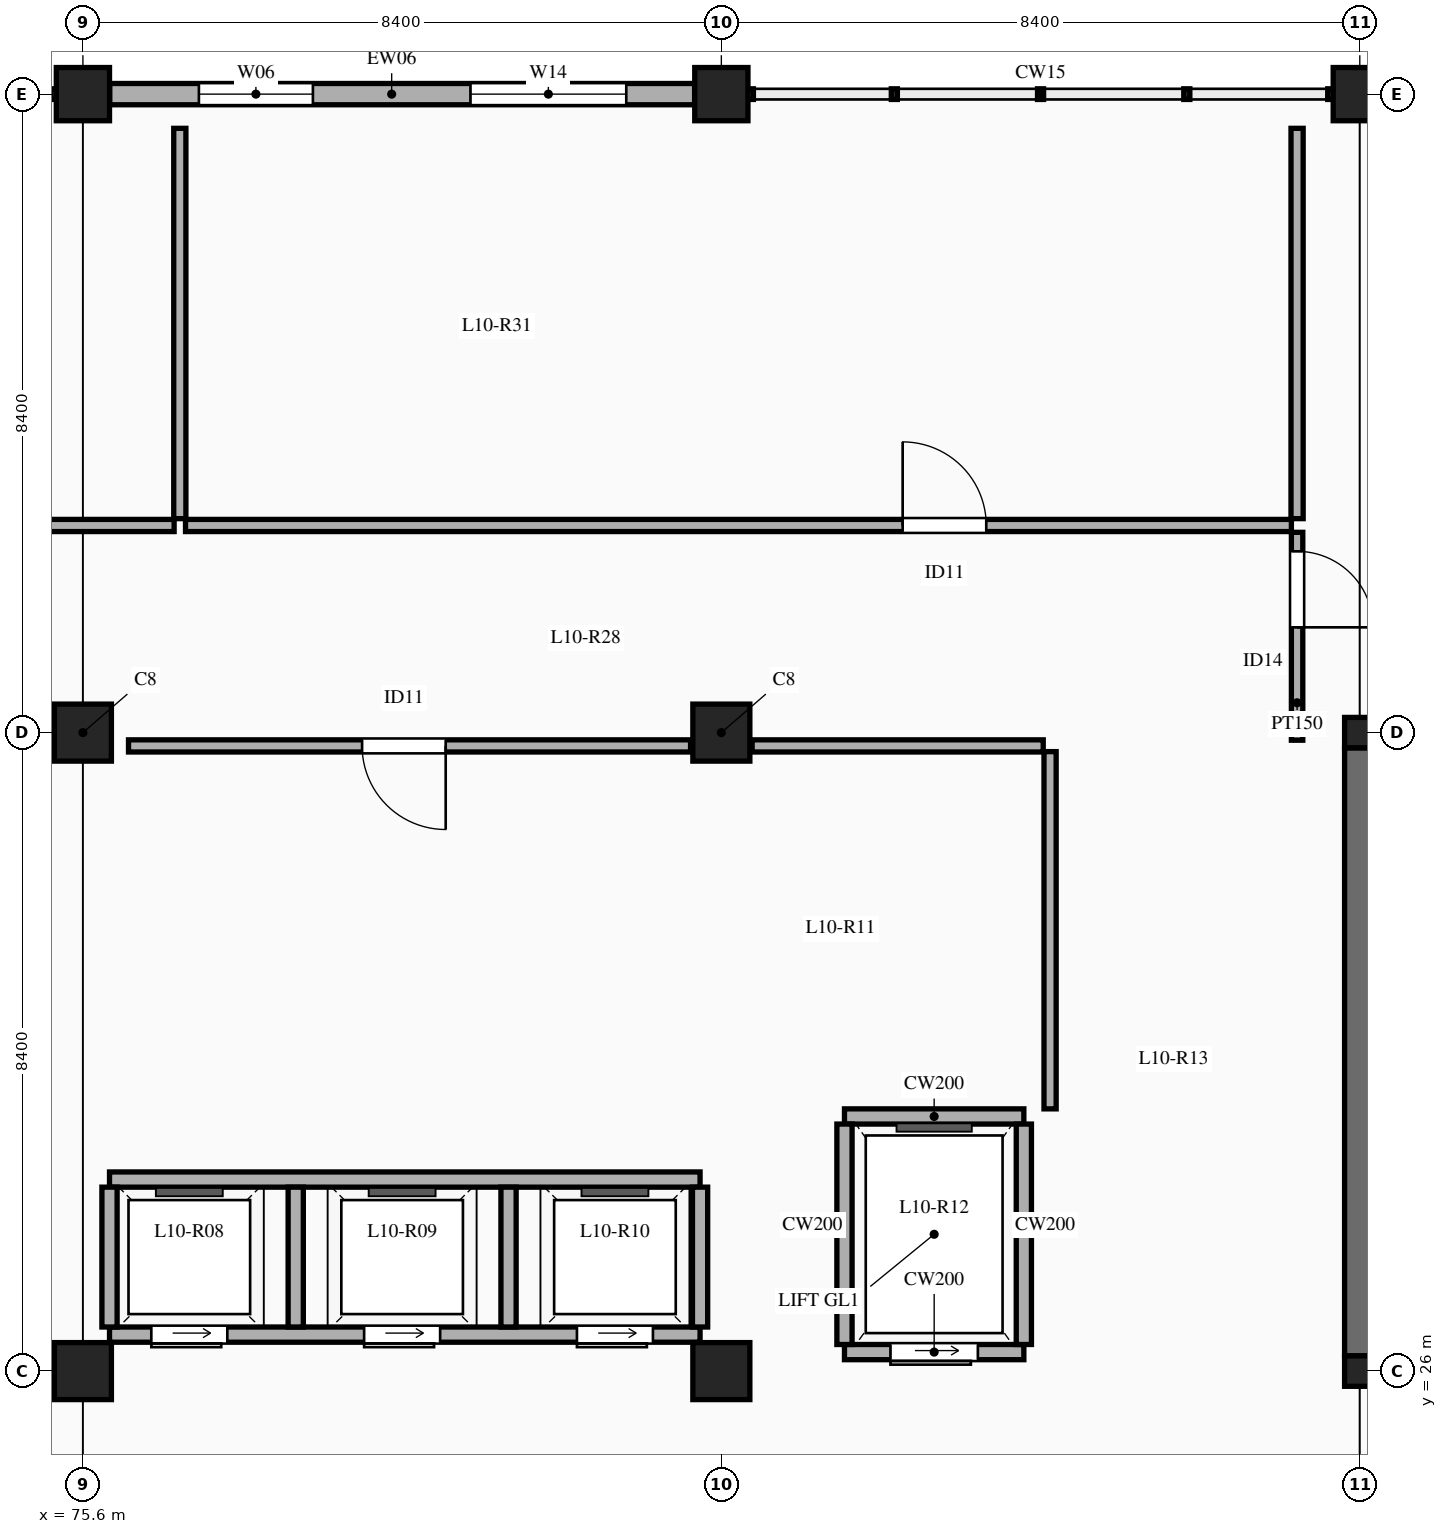
"""IFC4 building model, lengths in metres.
Left out: names, types, materials, properties, quantities, classifications, styles, units other than length and angle.
Written with IfcOpenShell. Run it as: python <this file> out.ifc"""

import sys

from ifc_helpers import new_model, si_unit, direction, frame, frame_2d, origin, origin_2d, place, context, subcontext, project, spatial, rectangle, extrude, element, fill, save


model = new_model("IFC4")
c1 = context("Model", 3, precision=1e-05, world=origin(), true_north=direction((0.0, 1.0)))
c2 = subcontext(c1, "Body", "Model", "MODEL_VIEW")
j1 = project(units=[si_unit("LENGTHUNIT", "METRE"), si_unit("PLANEANGLEUNIT", "RADIAN")], contexts=[c1])
p1 = place(None, origin())
s1 = spatial("IfcSite", under=j1, at=p1, CompositionType="ELEMENT")
p2 = place(p1, origin())
s2 = spatial("IfcBuilding", under=s1, at=p2, CompositionType="ELEMENT")
p3 = place(p2, frame((0.0, 0.0, 46.5)))
s3 = spatial("IfcBuildingStorey", under=s2, at=p3, CompositionType="ELEMENT", Elevation=46.5)
for number, where, z_axis, x_axis in (
    (1, (75.6, 26.0, 0.0), (0.0, 0.0, 1.0), (1.0, 0.0, 0.0)),
    (2, (75.6, 34.4, 0.0), (0.0, 0.0, 1.0), (1.0, 0.0, 0.0)),
):
    element("IfcColumn", number, at=place(p3, frame(where, z_axis=z_axis, x_axis=x_axis)), inside=s3, PredefinedType="COLUMN", context=c2, shape_type="SweptSolid", body=[
        extrude(rectangle(XDim=0.75, YDim=0.75, at=origin_2d()), origin(), (0.0, 0.0, 1.0), 4.5),
    ])
p4 = place(p3, frame((75.6, 42.8, 0.0), z_axis=(0.0, 0.0, 1.0), x_axis=(1.0, 0.0, 0.0)))
e3 = element("IfcColumn", 3, at=p4, inside=s3, PredefinedType="COLUMN", context=c2, shape_type="SweptSolid", body=[
    extrude(rectangle(XDim=0.7, YDim=0.7, at=origin_2d()), origin(), (0.0, 0.0, 1.0), 4.5),
])
for number, where, z_axis, x_axis in (
    (4, (84.0, 26.0, 0.0), (0.0, 0.0, 1.0), (1.0, 0.0, 0.0)),
    (5, (84.0, 34.4, 0.0), (0.0, 0.0, 1.0), (1.0, 0.0, 0.0)),
):
    element("IfcColumn", number, at=place(p3, frame(where, z_axis=z_axis, x_axis=x_axis)), inside=s3, PredefinedType="COLUMN", context=c2, shape_type="SweptSolid", body=[
        extrude(rectangle(XDim=0.75, YDim=0.75, at=origin_2d()), origin(), (0.0, 0.0, 1.0), 4.5),
    ])
p5 = place(p3, frame((84.0, 42.8, 0.0), z_axis=(0.0, 0.0, 1.0), x_axis=(1.0, 0.0, 0.0)))
e6 = element("IfcColumn", 6, at=p5, inside=s3, PredefinedType="COLUMN", context=c2, shape_type="SweptSolid", body=[
    extrude(rectangle(XDim=0.7, YDim=0.7, at=origin_2d()), origin(), (0.0, 0.0, 1.0), 4.5),
])
for number, where, z_axis, x_axis in (
    (7, (92.4, 26.0, 0.0), (0.0, 0.0, 1.0), (1.0, 0.0, 0.0)),
    (8, (92.4, 34.4, 0.0), (0.0, 0.0, 1.0), (1.0, 0.0, 0.0)),
):
    element("IfcColumn", number, at=place(p3, frame(where, z_axis=z_axis, x_axis=x_axis)), inside=s3, PredefinedType="COLUMN", context=c2, shape_type="SweptSolid", body=[
        extrude(rectangle(XDim=0.4, YDim=0.4, at=origin_2d()), origin(), (0.0, 0.0, 1.0), 4.5),
    ])
p6 = place(p3, frame((92.4, 42.8, 0.0), z_axis=(0.0, 0.0, 1.0), x_axis=(1.0, 0.0, 0.0)))
e9 = element("IfcColumn", 9, at=p6, inside=s3, PredefinedType="COLUMN", context=c2, shape_type="SweptSolid", body=[
    extrude(rectangle(XDim=0.7, YDim=0.7, at=origin_2d()), origin(), (0.0, 0.0, 1.0), 4.5),
])
p7 = place(p3, frame((92.4, 26.2, 0.0), z_axis=(0.0, 0.0, 1.0), x_axis=(0.0, 1.0, 0.0)))
e10 = element("IfcWall", 10, at=p7, inside=s3, PredefinedType="SHEAR", context=c2, shape_type="SweptSolid", body=[
    extrude(rectangle(XDim=8.0, YDim=0.4, at=frame_2d((4.0, 0.0))), origin(), (0.0, 0.0, 1.0), 4.5),
])
p8 = place(p3, frame((75.952, 42.8, 0.0), z_axis=(0.0, 0.0, 1.0), x_axis=(1.0, 0.0, 0.0)))
e11 = element("IfcWall", 11, at=p8, inside=s3, PredefinedType="ELEMENTEDWALL", context=c2, shape_type="SweptSolid", body=[
    extrude(rectangle(XDim=7.696, YDim=0.28, at=frame_2d((3.848, 0.0))), origin(), (0.0, 0.0, 1.0), 3.55),
])
p9 = place(p8, frame((1.174, 0.0, 0.9)))
e12 = element("IfcOpeningElement", 12, at=p9, cuts=e11, PredefinedType="OPENING", context=c2, shape_type="SweptSolid", body=[
    extrude(rectangle(XDim=1.5, YDim=2.0, at=frame_2d((0.75, 1.0))), frame((0.0, 0.15, 0.0), z_axis=(0.0, -1.0, 0.0), x_axis=(1.0, 0.0, 0.0)), (0.0, 0.0, 1.0), 0.3),
])
p10 = place(p8, frame((4.747, 0.0, 0.9)))
e13 = element("IfcOpeningElement", 13, at=p10, cuts=e11, PredefinedType="OPENING", context=c2, shape_type="SweptSolid", body=[
    extrude(rectangle(XDim=2.05, YDim=2.1, at=frame_2d((1.025, 1.05))), frame((0.0, 0.15, 0.0), z_axis=(0.0, -1.0, 0.0), x_axis=(1.0, 0.0, 0.0)), (0.0, 0.0, 1.0), 0.3),
])
p11 = place(p3, frame((75.95, 26.48, 0.0), z_axis=(0.0, 0.0, 1.0), x_axis=(1.0, 0.0, 0.0)))
e14 = element("IfcWall", 14, at=p11, inside=s3, PredefinedType="SOLIDWALL", context=c2, shape_type="SweptSolid", body=[
    extrude(rectangle(XDim=7.77, YDim=0.2, at=frame_2d((3.885, 0.0))), origin(), (0.0, 0.0, 1.0), 4.3),
])
p12 = place(p11, frame((0.55, 0.0, 0.0)))
e15 = element("IfcOpeningElement", 15, at=p12, cuts=e14, PredefinedType="OPENING", context=c2, shape_type="SweptSolid", body=[
    extrude(rectangle(XDim=1.0, YDim=2.15, at=frame_2d((0.5, 1.075))), frame((0.0, 0.11, 0.0), z_axis=(0.0, -1.0, 0.0), x_axis=(1.0, 0.0, 0.0)), (0.0, 0.0, 1.0), 0.22),
])
p13 = place(p11, frame((3.35, 0.0, 0.0)))
e16 = element("IfcOpeningElement", 16, at=p13, cuts=e14, PredefinedType="OPENING", context=c2, shape_type="SweptSolid", body=[
    extrude(rectangle(XDim=1.0, YDim=2.15, at=frame_2d((0.5, 1.075))), frame((0.0, 0.11, 0.0), z_axis=(0.0, -1.0, 0.0), x_axis=(1.0, 0.0, 0.0)), (0.0, 0.0, 1.0), 0.22),
])
p14 = place(p11, frame((6.15, 0.0, 0.0)))
e17 = element("IfcOpeningElement", 17, at=p14, cuts=e14, PredefinedType="OPENING", context=c2, shape_type="SweptSolid", body=[
    extrude(rectangle(XDim=1.0, YDim=2.15, at=frame_2d((0.5, 1.075))), frame((0.0, 0.11, 0.0), z_axis=(0.0, -1.0, 0.0), x_axis=(1.0, 0.0, 0.0)), (0.0, 0.0, 1.0), 0.22),
])
p15 = place(p3, frame((75.95, 28.52, 0.0), z_axis=(0.0, 0.0, 1.0), x_axis=(1.0, 0.0, 0.0)))
e18 = element("IfcWall", 18, at=p15, inside=s3, PredefinedType="SOLIDWALL", context=c2, shape_type="SweptSolid", body=[
    extrude(rectangle(XDim=7.77, YDim=0.2, at=frame_2d((3.885, 0.0))), origin(), (0.0, 0.0, 1.0), 4.3),
])
for number, where, z_axis, x_axis in (
    (19, (75.95, 26.58, 0.0), (0.0, 0.0, 1.0), (0.0, 1.0, 0.0)),
    (20, (78.4, 26.58, 0.0), (0.0, 0.0, 1.0), (0.0, 1.0, 0.0)),
    (21, (81.2, 26.58, 0.0), (0.0, 0.0, 1.0), (0.0, 1.0, 0.0)),
):
    element("IfcWall", number, at=place(p3, frame(where, z_axis=z_axis, x_axis=x_axis)), inside=s3, PredefinedType="SOLIDWALL", context=c2, shape_type="SweptSolid", body=[
        extrude(rectangle(XDim=1.84, YDim=0.2, at=frame_2d((0.92, 0.0))), origin(), (0.0, 0.0, 1.0), 4.3),
    ])
p16 = place(p3, frame((83.72, 26.58, 0.0), z_axis=(0.0, 0.0, 1.0), x_axis=(0.0, 1.0, 0.0)))
e22 = element("IfcWall", 22, at=p16, inside=s3, PredefinedType="SOLIDWALL", context=c2, shape_type="SweptSolid", body=[
    extrude(rectangle(XDim=1.84, YDim=0.2, at=frame_2d((0.92, 0.0))), origin(), (0.0, 0.0, 1.0), 3.88),
])
p17 = place(p3, frame((85.62, 26.25, 0.0), z_axis=(0.0, 0.0, 1.0), x_axis=(1.0, 0.0, 0.0)))
e23 = element("IfcWall", 23, at=p17, inside=s3, PredefinedType="SOLIDWALL", context=c2, shape_type="SweptSolid", body=[
    extrude(rectangle(XDim=2.36, YDim=0.2, at=frame_2d((1.18, 0.0))), origin(), (0.0, 0.0, 1.0), 3.83),
])
p18 = place(p17, frame((0.605, 0.0, 0.0)))
e24 = element("IfcOpeningElement", 24, at=p18, cuts=e23, PredefinedType="OPENING", context=c2, shape_type="SweptSolid", body=[
    extrude(rectangle(XDim=1.15, YDim=2.2, at=frame_2d((0.575, 1.1))), frame((0.0, 0.11, 0.0), z_axis=(0.0, -1.0, 0.0), x_axis=(1.0, 0.0, 0.0)), (0.0, 0.0, 1.0), 0.22),
])
p19 = place(p3, frame((85.62, 29.35, 0.0), z_axis=(0.0, 0.0, 1.0), x_axis=(1.0, 0.0, 0.0)))
e25 = element("IfcWall", 25, at=p19, inside=s3, PredefinedType="SOLIDWALL", context=c2, shape_type="SweptSolid", body=[
    extrude(rectangle(XDim=2.36, YDim=0.2, at=frame_2d((1.18, 0.0))), origin(), (0.0, 0.0, 1.0), 4.3),
])
p20 = place(p3, frame((85.62, 26.35, 0.0), z_axis=(0.0, 0.0, 1.0), x_axis=(0.0, 1.0, 0.0)))
e26 = element("IfcWall", 26, at=p20, inside=s3, PredefinedType="SOLIDWALL", context=c2, shape_type="SweptSolid", body=[
    extrude(rectangle(XDim=2.9, YDim=0.2, at=frame_2d((1.45, 0.0))), origin(), (0.0, 0.0, 1.0), 4.3),
])
p21 = place(p3, frame((87.98, 26.35, 0.0), z_axis=(0.0, 0.0, 1.0), x_axis=(0.0, 1.0, 0.0)))
e27 = element("IfcWall", 27, at=p21, inside=s3, PredefinedType="SOLIDWALL", context=c2, shape_type="SweptSolid", body=[
    extrude(rectangle(XDim=2.9, YDim=0.2, at=frame_2d((1.45, 0.0))), origin(), (0.0, 0.0, 1.0), 4.03),
])
p22 = place(p3, frame((88.325, 29.45, 0.0), z_axis=(0.0, 0.0, 1.0), x_axis=(0.0, 1.0, 0.0)))
e28 = element("IfcWall", 28, at=p22, inside=s3, PredefinedType="PARTITIONING", context=c2, shape_type="SweptSolid", body=[
    extrude(rectangle(XDim=4.7, YDim=0.16, at=frame_2d((2.35, 0.0))), origin(), (0.0, 0.0, 1.0), 3.45),
])
p23 = place(p3, frame((76.2, 34.225, 0.0), z_axis=(0.0, 0.0, 1.0), x_axis=(1.0, 0.0, 0.0)))
e29 = element("IfcWall", 29, at=p23, inside=s3, PredefinedType="PARTITIONING", context=c2, shape_type="SweptSolid", body=[
    extrude(rectangle(XDim=7.395, YDim=0.16, at=frame_2d((3.698, 0.0))), origin(), (0.0, 0.0, 1.0), 3.45),
])
p24 = place(p23, frame((3.073, 0.0, 0.0)))
e30 = element("IfcOpeningElement", 30, at=p24, cuts=e29, PredefinedType="OPENING", context=c2, shape_type="SweptSolid", body=[
    extrude(rectangle(XDim=1.1, YDim=2.2, at=frame_2d((0.55, 1.1))), frame((0.0, 0.09, 0.0), z_axis=(0.0, -1.0, 0.0), x_axis=(1.0, 0.0, 0.0)), (0.0, 0.0, 1.0), 0.18),
])
p25 = place(p3, frame((84.405, 34.225, 0.0), z_axis=(0.0, 0.0, 1.0), x_axis=(1.0, 0.0, 0.0)))
e31 = element("IfcWall", 31, at=p25, inside=s3, PredefinedType="PARTITIONING", context=c2, shape_type="SweptSolid", body=[
    extrude(rectangle(XDim=3.83, YDim=0.16, at=frame_2d((1.915, 0.0))), origin(), (0.0, 0.0, 1.0), 3.45),
])
p26 = place(p3, frame((60.415, 37.125, 0.0), z_axis=(0.0, 0.0, 1.0), x_axis=(1.0, 0.0, 0.0)))
e32 = element("IfcWall", 32, at=p26, inside=s3, PredefinedType="PARTITIONING", context=c2, shape_type="SweptSolid", body=[
    extrude(rectangle(XDim=16.385, YDim=0.16, at=frame_2d((8.192, 0.0))), origin(), (0.0, 0.0, 1.0), 3.45),
])
p27 = place(p26, frame((8.613, 0.0, 0.0)))
e33 = element("IfcOpeningElement", 33, at=p27, cuts=e32, PredefinedType="OPENING", context=c2, shape_type="SweptSolid", body=[
    extrude(rectangle(XDim=1.1, YDim=2.2, at=frame_2d((0.55, 1.1))), frame((0.0, 0.09, 0.0), z_axis=(0.0, -1.0, 0.0), x_axis=(1.0, 0.0, 0.0)), (0.0, 0.0, 1.0), 0.18),
])
p28 = place(p3, frame((76.95, 37.125, 0.0), z_axis=(0.0, 0.0, 1.0), x_axis=(1.0, 0.0, 0.0)))
e34 = element("IfcWall", 34, at=p28, inside=s3, PredefinedType="PARTITIONING", context=c2, shape_type="SweptSolid", body=[
    extrude(rectangle(XDim=14.55, YDim=0.16, at=frame_2d((7.275, 0.0))), origin(), (0.0, 0.0, 1.0), 3.45),
])
p29 = place(p28, frame((9.436, 0.0, 0.0)))
e35 = element("IfcOpeningElement", 35, at=p29, cuts=e34, PredefinedType="OPENING", context=c2, shape_type="SweptSolid", body=[
    extrude(rectangle(XDim=1.1, YDim=2.2, at=frame_2d((0.55, 1.1))), frame((0.0, 0.09, 0.0), z_axis=(0.0, -1.0, 0.0), x_axis=(1.0, 0.0, 0.0)), (0.0, 0.0, 1.0), 0.18),
])
p30 = place(p3, frame((91.575, 34.3, 0.0), z_axis=(0.0, 0.0, 1.0), x_axis=(0.0, 1.0, 0.0)))
e36 = element("IfcWall", 36, at=p30, inside=s3, PredefinedType="PARTITIONING", context=c2, shape_type="SweptSolid", body=[
    extrude(rectangle(XDim=2.735, YDim=0.15, at=frame_2d((1.367, 0.0))), origin(), (0.0, 0.0, 1.0), 3.45),
])
p31 = place(p30, frame((1.485, 0.0, 0.0)))
e37 = element("IfcOpeningElement", 37, at=p31, cuts=e36, PredefinedType="OPENING", context=c2, shape_type="SweptSolid", body=[
    extrude(rectangle(XDim=1.0, YDim=2.15, at=frame_2d((0.5, 1.075))), frame((0.0, 0.085, 0.0), z_axis=(0.0, -1.0, 0.0), x_axis=(1.0, 0.0, 0.0)), (0.0, 0.0, 1.0), 0.17),
])
for number, where, z_axis, x_axis in (
    (38, (76.875, 37.215, 0.0), (0.0, 0.0, 1.0), (0.0, 1.0, 0.0)),
    (39, (91.575, 37.215, 0.0), (0.0, 0.0, 1.0), (0.0, 1.0, 0.0)),
):
    element("IfcWall", number, at=place(p3, frame(where, z_axis=z_axis, x_axis=x_axis)), inside=s3, PredefinedType="PARTITIONING", context=c2, shape_type="SweptSolid", body=[
        extrude(rectangle(XDim=5.135, YDim=0.16, at=frame_2d((2.567, 0.0))), origin(), (0.0, 0.0, 1.0), 3.45),
    ])
p32 = place(p9, origin())
e40 = element("IfcWindow", 40, at=p32, inside=s3, PartitioningType="DOUBLE_PANEL_VERTICAL", PredefinedType="WINDOW", context=c2, shape_type="SweptSolid", body=[
    extrude(rectangle(XDim=1.5, YDim=2.0, at=frame_2d((0.75, 1.0))), frame((0.0, 0.03, 0.0), z_axis=(0.0, -1.0, 0.0), x_axis=(1.0, 0.0, 0.0)), (0.0, 0.0, 1.0), 0.06),
])
fill(e12, e40)
p33 = place(p10, origin())
e41 = element("IfcWindow", 41, at=p33, inside=s3, PartitioningType="TRIPLE_PANEL_VERTICAL", PredefinedType="WINDOW", context=c2, shape_type="SweptSolid", body=[
    extrude(rectangle(XDim=2.05, YDim=2.1, at=frame_2d((1.025, 1.05))), frame((0.0, 0.03, 0.0), z_axis=(0.0, -1.0, 0.0), x_axis=(1.0, 0.0, 0.0)), (0.0, 0.0, 1.0), 0.06),
])
fill(e13, e41)
p34 = place(p12, frame((1.0, 0.0, 0.0), z_axis=(0.0, 0.0, 1.0), x_axis=(-1.0, 0.0, 0.0)))
e42 = element("IfcDoor", 42, at=p34, inside=s3, OperationType="SLIDING_TO_LEFT", PredefinedType="DOOR", context=c2, shape_type="SweptSolid", body=[
    extrude(rectangle(XDim=1.0, YDim=2.15, at=frame_2d((0.5, 1.075))), frame((0.0, 0.025, 0.0), z_axis=(0.0, -1.0, 0.0), x_axis=(1.0, 0.0, 0.0)), (0.0, 0.0, 1.0), 0.05),
])
fill(e15, e42)
p35 = place(p13, frame((1.0, 0.0, 0.0), z_axis=(0.0, 0.0, 1.0), x_axis=(-1.0, 0.0, 0.0)))
e43 = element("IfcDoor", 43, at=p35, inside=s3, OperationType="SLIDING_TO_LEFT", PredefinedType="DOOR", context=c2, shape_type="SweptSolid", body=[
    extrude(rectangle(XDim=1.0, YDim=2.15, at=frame_2d((0.5, 1.075))), frame((0.0, 0.025, 0.0), z_axis=(0.0, -1.0, 0.0), x_axis=(1.0, 0.0, 0.0)), (0.0, 0.0, 1.0), 0.05),
])
fill(e16, e43)
p36 = place(p14, frame((1.0, 0.0, 0.0), z_axis=(0.0, 0.0, 1.0), x_axis=(-1.0, 0.0, 0.0)))
e44 = element("IfcDoor", 44, at=p36, inside=s3, OperationType="SLIDING_TO_LEFT", PredefinedType="DOOR", context=c2, shape_type="SweptSolid", body=[
    extrude(rectangle(XDim=1.0, YDim=2.15, at=frame_2d((0.5, 1.075))), frame((0.0, 0.025, 0.0), z_axis=(0.0, -1.0, 0.0), x_axis=(1.0, 0.0, 0.0)), (0.0, 0.0, 1.0), 0.05),
])
fill(e17, e44)
p37 = place(p18, frame((1.15, 0.0, 0.0), z_axis=(0.0, 0.0, 1.0), x_axis=(-1.0, 0.0, 0.0)))
e45 = element("IfcDoor", 45, at=p37, inside=s3, OperationType="SLIDING_TO_LEFT", PredefinedType="DOOR", context=c2, shape_type="SweptSolid", body=[
    extrude(rectangle(XDim=1.15, YDim=2.2, at=frame_2d((0.575, 1.1))), frame((0.0, 0.025, 0.0), z_axis=(0.0, -1.0, 0.0), x_axis=(1.0, 0.0, 0.0)), (0.0, 0.0, 1.0), 0.05),
])
fill(e24, e45)
p38 = place(p24, frame((1.1, 0.0, 0.0), z_axis=(0.0, 0.0, 1.0), x_axis=(-1.0, 0.0, 0.0)))
e46 = element("IfcDoor", 46, at=p38, inside=s3, OperationType="SINGLE_SWING_LEFT", PredefinedType="DOOR", context=c2, shape_type="SweptSolid", body=[
    extrude(rectangle(XDim=1.1, YDim=2.2, at=frame_2d((0.55, 1.1))), frame((0.0, 0.025, 0.0), z_axis=(0.0, -1.0, 0.0), x_axis=(1.0, 0.0, 0.0)), (0.0, 0.0, 1.0), 0.05),
])
fill(e30, e46)
p39 = place(p29, origin())
e47 = element("IfcDoor", 47, at=p39, inside=s3, OperationType="SINGLE_SWING_LEFT", PredefinedType="DOOR", context=c2, shape_type="SweptSolid", body=[
    extrude(rectangle(XDim=1.1, YDim=2.2, at=frame_2d((0.55, 1.1))), frame((0.0, 0.025, 0.0), z_axis=(0.0, -1.0, 0.0), x_axis=(1.0, 0.0, 0.0)), (0.0, 0.0, 1.0), 0.05),
])
fill(e35, e47)
p40 = place(p31, frame((1.0, 0.0, 0.0), z_axis=(0.0, 0.0, 1.0), x_axis=(-1.0, 0.0, 0.0)))
e48 = element("IfcDoor", 48, at=p40, inside=s3, OperationType="SINGLE_SWING_RIGHT", PredefinedType="DOOR", context=c2, shape_type="SweptSolid", body=[
    extrude(rectangle(XDim=1.0, YDim=2.15, at=frame_2d((0.5, 1.075))), frame((0.0, 0.025, 0.0), z_axis=(0.0, -1.0, 0.0), x_axis=(1.0, 0.0, 0.0)), (0.0, 0.0, 1.0), 0.05),
])
fill(e37, e48)
save(model, sys.argv[1])
